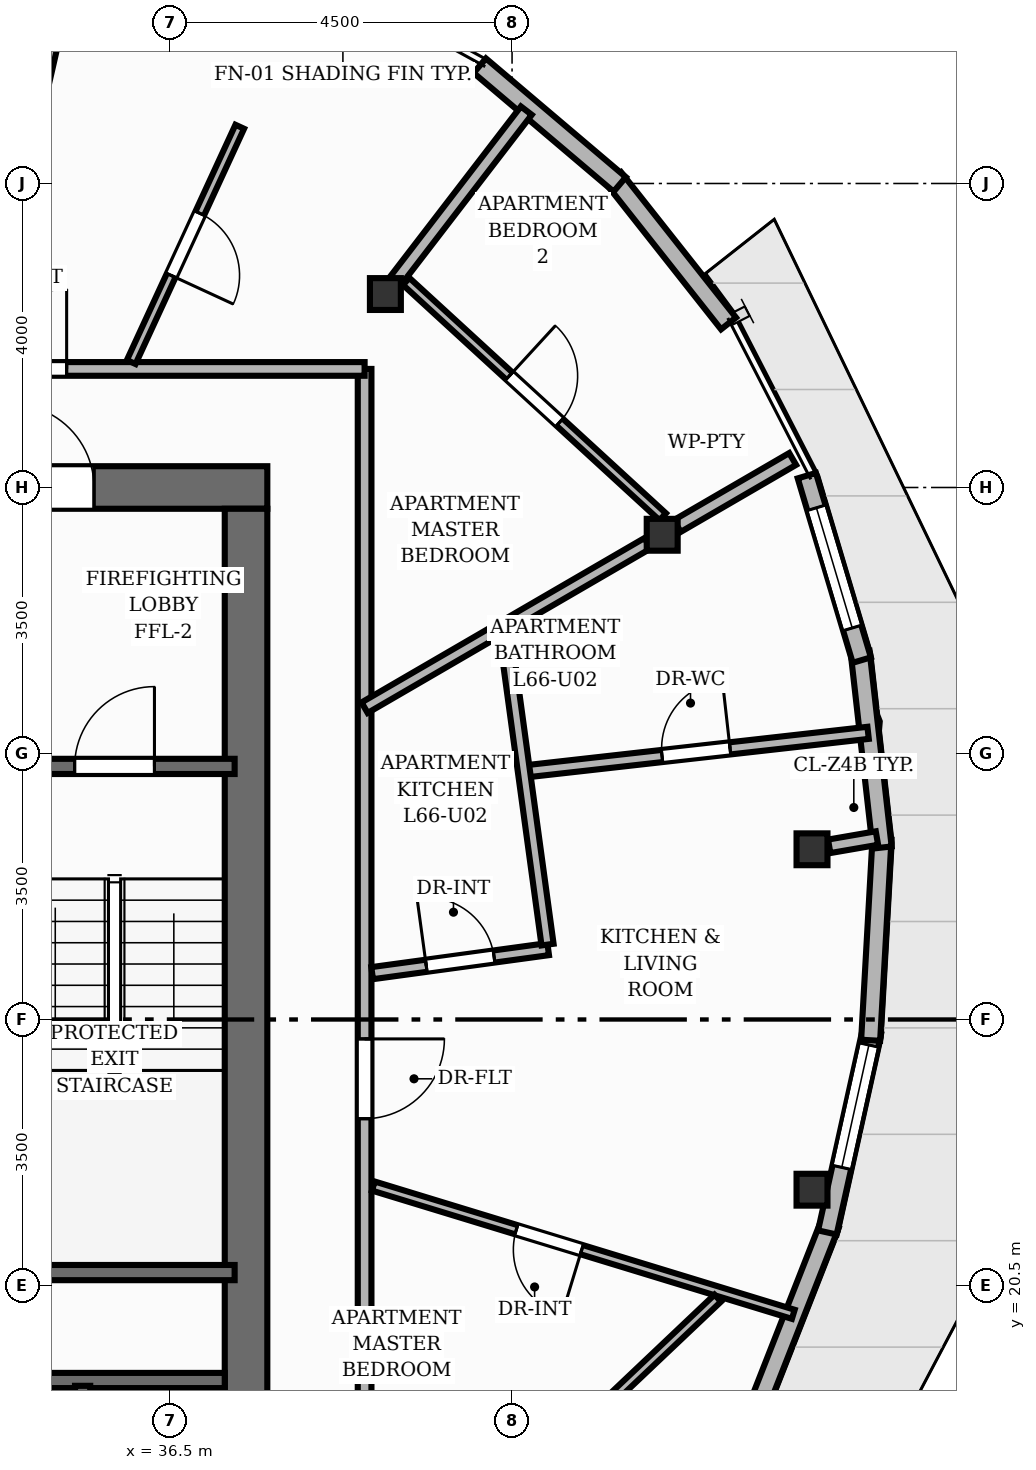
"""IFC4 building model, lengths in metres.
Left out: names, types, materials, properties, quantities, classifications, styles, units other than length and angle.
Written with IfcOpenShell. Run it as: python <this file> out.ifc"""

import sys

from ifc_helpers import new_model, si_unit, direction, frame, frame_2d, origin, origin_2d, place, context, subcontext, project, spatial, rectangle, i_section, extrude, element, fill, save


model = new_model("IFC4")
c1 = context("Model", 3, precision=1e-05, world=origin(), true_north=direction((0.0, 1.0)))
c2 = subcontext(c1, "Body", "Model", "MODEL_VIEW")
j1 = project(units=[si_unit("LENGTHUNIT", "METRE"), si_unit("PLANEANGLEUNIT", "RADIAN")], contexts=[c1])
p1 = place(None, origin())
s1 = spatial("IfcSite", under=j1, at=p1, CompositionType="ELEMENT")
p2 = place(p1, origin())
s2 = spatial("IfcBuilding", under=s1, at=p2, CompositionType="ELEMENT")
p3 = place(p2, frame((0.0, 0.0, 220.64)))
s3 = spatial("IfcBuildingStorey", under=s2, at=p3, CompositionType="ELEMENT", Elevation=220.64)
p4 = place(p3, frame((26.22, 31.0, 0.0), z_axis=(0.0, 0.0, 1.0), x_axis=(1.0, 0.0, 0.0)))
e1 = element("IfcWall", 1, at=p4, inside=s3, PredefinedType="SHEAR", context=c2, shape_type="SweptSolid", body=[
    extrude(rectangle(XDim=11.56, YDim=0.56, at=frame_2d((5.78, 0.0))), origin(), (0.0, 0.0, 1.0), 3.2),
])
p5 = place(p4, frame((8.18, 0.0, 0.0)))
e2 = element("IfcOpeningElement", 2, at=p5, cuts=e1, PredefinedType="OPENING", context=c2, shape_type="SweptSolid", body=[
    extrude(rectangle(XDim=1.1, YDim=2.15, at=frame_2d((0.55, 1.075))), frame((0.0, 0.29, 0.0), z_axis=(0.0, -1.0, 0.0), x_axis=(1.0, 0.0, 0.0)), (0.0, 0.0, 1.0), 0.58),
])
p6 = place(p4, frame((0.805, 0.0, 0.0)))
e3 = element("IfcOpeningElement", 3, at=p6, cuts=e1, PredefinedType="OPENING", context=c2, shape_type="SweptSolid", body=[
    extrude(rectangle(XDim=1.05, YDim=2.15, at=frame_2d((0.525, 1.075))), frame((0.0, 0.29, 0.0), z_axis=(0.0, -1.0, 0.0), x_axis=(1.0, 0.0, 0.0)), (0.0, 0.0, 1.0), 0.58),
])
p7 = place(p4, frame((2.555, 0.0, 0.0)))
e4 = element("IfcOpeningElement", 4, at=p7, cuts=e1, PredefinedType="OPENING", context=c2, shape_type="SweptSolid", body=[
    extrude(rectangle(XDim=1.05, YDim=2.15, at=frame_2d((0.525, 1.075))), frame((0.0, 0.29, 0.0), z_axis=(0.0, -1.0, 0.0), x_axis=(1.0, 0.0, 0.0)), (0.0, 0.0, 1.0), 0.58),
])
p8 = place(p4, frame((4.305, 0.0, 0.0)))
e5 = element("IfcOpeningElement", 5, at=p8, cuts=e1, PredefinedType="OPENING", context=c2, shape_type="SweptSolid", body=[
    extrude(rectangle(XDim=1.05, YDim=2.15, at=frame_2d((0.525, 1.075))), frame((0.0, 0.29, 0.0), z_axis=(0.0, -1.0, 0.0), x_axis=(1.0, 0.0, 0.0)), (0.0, 0.0, 1.0), 0.58),
])
p9 = place(p3, frame((37.5, 17.28, 0.0), z_axis=(0.0, 0.0, 1.0), x_axis=(0.0, 1.0, 0.0)))
e6 = element("IfcWall", 6, at=p9, inside=s3, PredefinedType="SHEAR", context=c2, shape_type="SweptSolid", body=[
    extrude(rectangle(XDim=13.44, YDim=0.56, at=frame_2d((6.72, 0.0))), origin(), (0.0, 0.0, 1.0), 3.2),
])
for number, where, z_axis, x_axis in (
    (7, (44.946, 26.24, 0.0), (0.0, 0.0, 1.0), (1.0, 0.0, 0.0)),
    (8, (42.975, 30.378, 0.0), (0.0, 0.0, 1.0), (1.0, 0.0, 0.0)),
    (9, (39.333, 33.545, 0.0), (0.0, 0.0, 1.0), (1.0, 0.0, 0.0)),
    (10, (44.946, 21.76, 0.0), (0.0, 0.0, 1.0), (1.0, 0.0, 0.0)),
):
    element("IfcColumn", number, at=place(p3, frame(where, z_axis=z_axis, x_axis=x_axis)), inside=s3, PredefinedType="COLUMN", context=c2, shape_type="SweptSolid", body=[
        extrude(i_section(OverallWidth=0.407, OverallDepth=0.419, WebThickness=0.031, FlangeThickness=0.049, at=origin_2d()), origin(), (0.0, 0.0, 1.0), 3.2),
    ])
p10 = place(p3, frame((45.18, 21.302, 0.0), z_axis=(0.0, 0.0, 1.0), x_axis=(-0.365588934877, -0.930776412838, 0.0)))
e11 = element("IfcWall", 11, at=p10, inside=s3, PredefinedType="SOLIDWALL", context=c2, shape_type="SweptSolid", body=[
    extrude(rectangle(XDim=2.739, YDim=0.25, at=frame_2d((1.369, 0.0))), origin(), (0.0, 0.0, 1.0), 2.577),
])
p11 = place(p3, frame((45.733, 23.836, 0.0), z_axis=(0.0, 0.0, 1.0), x_axis=(-0.21633718885, -0.976318708579, 0.0)))
e12 = element("IfcWall", 12, at=p11, inside=s3, PredefinedType="SOLIDWALL", context=c2, shape_type="SweptSolid", body=[
    extrude(rectangle(XDim=2.702, YDim=0.25, at=frame_2d((1.351, 0.0))), origin(), (0.0, 0.0, 1.0), 2.577),
])
p12 = place(p11, frame((0.175, 0.0, 0.85)))
e13 = element("IfcOpeningElement", 13, at=p12, cuts=e12, PredefinedType="OPENING", context=c2, shape_type="SweptSolid", body=[
    extrude(rectangle(XDim=1.65, YDim=1.55, at=frame_2d((0.825, 0.775))), frame((0.0, 0.135, 0.0), z_axis=(0.0, -1.0, 0.0), x_axis=(1.0, 0.0, 0.0)), (0.0, 0.0, 1.0), 0.27),
])
p13 = place(p3, frame((45.867, 26.374, 0.0), z_axis=(0.0, 0.0, 1.0), x_axis=(-0.056270814174, -0.998415542483, 0.0)))
e14 = element("IfcWall", 14, at=p13, inside=s3, PredefinedType="SOLIDWALL", context=c2, shape_type="SweptSolid", body=[
    extrude(rectangle(XDim=2.651, YDim=0.25, at=frame_2d((1.325, 0.0))), origin(), (0.0, 0.0, 1.0), 2.96),
])
p14 = place(p3, frame((45.579, 28.839, 0.0), z_axis=(0.0, 0.0, 1.0), x_axis=(0.112260931198, -0.993678762642, 0.0)))
e15 = element("IfcWall", 15, at=p14, inside=s3, PredefinedType="SOLIDWALL", context=c2, shape_type="SweptSolid", body=[
    extrude(rectangle(XDim=2.592, YDim=0.25, at=frame_2d((1.296, 0.0))), origin(), (0.0, 0.0, 1.0), 2.96),
])
p15 = place(p3, frame((44.878, 31.156, 0.0), z_axis=(0.0, 0.0, 1.0), x_axis=(0.285604720301, -0.958347506775, 0.0)))
e16 = element("IfcWall", 16, at=p15, inside=s3, PredefinedType="SOLIDWALL", context=c2, shape_type="SweptSolid", body=[
    extrude(rectangle(XDim=2.532, YDim=0.25, at=frame_2d((1.266, 0.0))), origin(), (0.0, 0.0, 1.0), 2.96),
])
p16 = place(p15, frame((0.441, 0.0, 0.85)))
e17 = element("IfcOpeningElement", 17, at=p16, cuts=e16, PredefinedType="OPENING", context=c2, shape_type="SweptSolid", body=[
    extrude(rectangle(XDim=1.65, YDim=1.55, at=frame_2d((0.825, 0.775))), frame((0.0, 0.135, 0.0), z_axis=(0.0, -1.0, 0.0), x_axis=(1.0, 0.0, 0.0)), (0.0, 0.0, 1.0), 0.27),
])
p17 = place(p3, frame((42.337, 35.071, 0.0), z_axis=(0.0, 0.0, 1.0), x_axis=(0.619881401672, -0.784695512833, 0.0)))
e18 = element("IfcWall", 18, at=p17, inside=s3, PredefinedType="SOLIDWALL", context=c2, shape_type="SweptSolid", body=[
    extrude(rectangle(XDim=2.437, YDim=0.25, at=frame_2d((1.218, 0.0))), origin(), (0.0, 0.0, 1.0), 2.96),
])
p18 = place(p3, frame((40.575, 36.55, 0.0), z_axis=(0.0, 0.0, 1.0), x_axis=(0.762614923672, -0.646852748462, 0.0)))
e19 = element("IfcWall", 19, at=p18, inside=s3, PredefinedType="SOLIDWALL", context=c2, shape_type="SweptSolid", body=[
    extrude(rectangle(XDim=2.415, YDim=0.25, at=frame_2d((1.208, 0.0))), origin(), (0.0, 0.0, 1.0), 2.96),
])
p19 = place(p3, frame((34.11, 20.67, 0.0), z_axis=(0.0, 0.0, 1.0), x_axis=(1.0, 0.0, 0.0)))
e20 = element("IfcWall", 20, at=p19, inside=s3, PredefinedType="SHEAR", context=c2, shape_type="SweptSolid", body=[
    extrude(rectangle(XDim=3.24, YDim=0.2, at=frame_2d((1.62, 0.0))), origin(), (0.0, 0.0, 1.0), 3.2),
])
p20 = place(p3, frame((34.11, 27.33, 0.0), z_axis=(0.0, 0.0, 1.0), x_axis=(1.0, 0.0, 0.0)))
e21 = element("IfcWall", 21, at=p20, inside=s3, PredefinedType="SHEAR", context=c2, shape_type="SweptSolid", body=[
    extrude(rectangle(XDim=3.24, YDim=0.2, at=frame_2d((1.62, 0.0))), origin(), (0.0, 0.0, 1.0), 3.2),
])
p21 = place(p20, frame((1.135, 0.0, 0.0)))
e22 = element("IfcOpeningElement", 22, at=p21, cuts=e21, PredefinedType="OPENING", context=c2, shape_type="SweptSolid", body=[
    extrude(rectangle(XDim=1.05, YDim=2.15, at=frame_2d((0.525, 1.075))), frame((0.0, 0.11, 0.0), z_axis=(0.0, -1.0, 0.0), x_axis=(1.0, 0.0, 0.0)), (0.0, 0.0, 1.0), 0.22),
])
p22 = place(p3, frame((33.5, 19.25, 0.0), z_axis=(0.0, 0.0, 1.0), x_axis=(1.0, 0.0, 0.0)))
e23 = element("IfcWall", 23, at=p22, inside=s3, PredefinedType="SHEAR", context=c2, shape_type="SweptSolid", body=[
    extrude(rectangle(XDim=3.72, YDim=0.2, at=frame_2d((1.86, 0.0))), origin(), (0.0, 0.0, 1.0), 3.2),
])
p23 = place(p3, frame((35.35, 17.32, 0.0), z_axis=(0.0, 0.0, 1.0), x_axis=(0.0, 1.0, 0.0)))
e24 = element("IfcWall", 24, at=p23, inside=s3, PredefinedType="SHEAR", context=c2, shape_type="SweptSolid", body=[
    extrude(rectangle(XDim=1.86, YDim=0.2, at=frame_2d((0.93, 0.0))), origin(), (0.0, 0.0, 1.0), 3.2),
])
p24 = place(p3, frame((45.173, 26.279, 0.0), z_axis=(0.0, 0.0, 1.0), x_axis=(0.985371537423, 0.170419873359, 0.0)))
e25 = element("IfcWall", 25, at=p24, inside=s3, PredefinedType="PARTITIONING", context=c2, shape_type="SweptSolid", body=[
    extrude(rectangle(XDim=0.637, YDim=0.18, at=frame_2d((0.319, 0.0))), origin(), (0.0, 0.0, 1.0), 2.404),
])
p25 = place(p3, frame((43.174, 30.493, 0.0), z_axis=(0.0, 0.0, 1.0), x_axis=(0.864599922959, 0.502460917106, 0.0)))
e26 = element("IfcWall", 26, at=p25, inside=s3, PredefinedType="PARTITIONING", context=c2, shape_type="SweptSolid", body=[
    extrude(rectangle(XDim=1.756, YDim=0.18, at=frame_2d((0.878, 0.0))), origin(), (0.0, 0.0, 1.0), 2.404),
])
p26 = place(p3, frame((39.473, 33.727, 0.0), z_axis=(0.0, 0.0, 1.0), x_axis=(0.609232660573, 0.792991529142, 0.0)))
e27 = element("IfcWall", 27, at=p26, inside=s3, PredefinedType="PARTITIONING", context=c2, shape_type="SweptSolid", body=[
    extrude(rectangle(XDim=2.814, YDim=0.18, at=frame_2d((1.407, 0.0))), origin(), (0.0, 0.0, 1.0), 2.404),
])
p27 = place(p3, frame((34.626, 35.483, 0.0), z_axis=(0.0, 0.0, 1.0), x_axis=(0.22291168124, 0.974838644272, 0.0)))
e28 = element("IfcWall", 28, at=p27, inside=s3, PredefinedType="PARTITIONING", context=c2, shape_type="SweptSolid", body=[
    extrude(rectangle(XDim=2.976, YDim=0.18, at=frame_2d((1.488, 0.0))), origin(), (0.0, 0.0, 1.0), 2.404),
])
p28 = place(p3, frame((39.06, 32.56, 0.0), z_axis=(0.0, 0.0, 1.0), x_axis=(0.0, -1.0, 0.0)))
e29 = element("IfcWall", 29, at=p28, inside=s3, PredefinedType="PARTITIONING", context=c2, shape_type="SweptSolid", body=[
    extrude(rectangle(XDim=17.12, YDim=0.18, at=frame_2d((8.56, 0.0))), origin(), (0.0, 0.0, 1.0), 2.955),
])
p29 = place(p28, frame((8.815, 0.0, 0.0)))
e30 = element("IfcOpeningElement", 30, at=p29, cuts=e29, PredefinedType="OPENING", context=c2, shape_type="SweptSolid", body=[
    extrude(rectangle(XDim=1.05, YDim=2.15, at=frame_2d((0.525, 1.075))), frame((0.0, 0.1, 0.0), z_axis=(0.0, -1.0, 0.0), x_axis=(1.0, 0.0, 0.0)), (0.0, 0.0, 1.0), 0.2),
])
p30 = place(p3, frame((33.26, 32.56, 0.0), z_axis=(0.0, 0.0, 1.0), x_axis=(1.0, 0.0, 0.0)))
e31 = element("IfcWall", 31, at=p30, inside=s3, PredefinedType="PARTITIONING", context=c2, shape_type="SweptSolid", body=[
    extrude(rectangle(XDim=5.8, YDim=0.18, at=frame_2d((2.9, 0.0))), origin(), (0.0, 0.0, 1.0), 2.955),
])
p31 = place(p30, frame((0.83, 0.0, 0.0)))
e32 = element("IfcOpeningElement", 32, at=p31, cuts=e31, PredefinedType="OPENING", context=c2, shape_type="SweptSolid", body=[
    extrude(rectangle(XDim=1.05, YDim=2.15, at=frame_2d((0.525, 1.075))), frame((0.0, 0.1, 0.0), z_axis=(0.0, -1.0, 0.0), x_axis=(1.0, 0.0, 0.0)), (0.0, 0.0, 1.0), 0.2),
])
p32 = place(p3, frame((41.156, 27.262, 0.0), z_axis=(0.0, 0.0, 1.0), x_axis=(0.993735184374, 0.111760383578, 0.0)))
e33 = element("IfcWall", 33, at=p32, inside=s3, PredefinedType="PLUMBINGWALL", context=c2, shape_type="SweptSolid", body=[
    extrude(rectangle(XDim=4.557, YDim=0.16, at=frame_2d((2.278, 0.0))), origin(), (0.0, 0.0, 1.0), 2.692),
])
p33 = place(p32, frame((1.829, 0.0, 0.0)))
e34 = element("IfcOpeningElement", 34, at=p33, cuts=e33, PredefinedType="OPENING", context=c2, shape_type="SweptSolid", body=[
    extrude(rectangle(XDim=0.9, YDim=2.1, at=frame_2d((0.45, 1.05))), frame((0.0, 0.09, 0.0), z_axis=(0.0, -1.0, 0.0), x_axis=(1.0, 0.0, 0.0)), (0.0, 0.0, 1.0), 0.18),
])
p34 = place(p3, frame((44.7, 20.121, 0.0), z_axis=(0.0, 0.0, 1.0), x_axis=(-0.956379122361, 0.29212835246, 0.0)))
e35 = element("IfcWall", 35, at=p34, inside=s3, PredefinedType="PARTITIONING", context=c2, shape_type="SweptSolid", body=[
    extrude(rectangle(XDim=5.777, YDim=0.125, at=frame_2d((2.889, 0.0))), origin(), (0.0, 0.0, 1.0), 2.692),
])
p35 = place(p34, frame((2.91, 0.0, 0.0)))
e36 = element("IfcOpeningElement", 36, at=p35, cuts=e35, PredefinedType="OPENING", context=c2, shape_type="SweptSolid", body=[
    extrude(rectangle(XDim=0.9, YDim=2.1, at=frame_2d((0.45, 1.05))), frame((0.0, 0.073, 0.0), z_axis=(0.0, -1.0, 0.0), x_axis=(1.0, 0.0, 0.0)), (0.0, 0.0, 1.0), 0.145),
])
p36 = place(p3, frame((39.159, 24.61, 0.0), z_axis=(0.0, 0.0, 1.0), x_axis=(0.990823810893, 0.135159815654, 0.0)))
e37 = element("IfcWall", 37, at=p36, inside=s3, PredefinedType="PLUMBINGWALL", context=c2, shape_type="SweptSolid", body=[
    extrude(rectangle(XDim=2.337, YDim=0.16, at=frame_2d((1.169, 0.0))), origin(), (0.0, 0.0, 1.0), 2.692),
])
p37 = place(p36, frame((0.719, 0.0, 0.0)))
e38 = element("IfcOpeningElement", 38, at=p37, cuts=e37, PredefinedType="OPENING", context=c2, shape_type="SweptSolid", body=[
    extrude(rectangle(XDim=0.9, YDim=2.1, at=frame_2d((0.45, 1.05))), frame((0.0, 0.09, 0.0), z_axis=(0.0, -1.0, 0.0), x_axis=(1.0, 0.0, 0.0)), (0.0, 0.0, 1.0), 0.18),
])
p38 = place(p3, frame((41.467, 24.985, 0.0), z_axis=(0.0, 0.0, 1.0), x_axis=(-0.135218975067, 0.990815739066, 0.0)))
e39 = element("IfcWall", 39, at=p38, inside=s3, PredefinedType="PLUMBINGWALL", context=c2, shape_type="SweptSolid", body=[
    extrude(rectangle(XDim=4.223, YDim=0.16, at=frame_2d((2.112, 0.0))), origin(), (0.0, 0.0, 1.0), 2.955),
])
p39 = place(p3, frame((39.06, 28.103, 0.0), z_axis=(0.0, 0.0, 1.0), x_axis=(0.864618907014, 0.502428249239, 0.0)))
e40 = element("IfcWall", 40, at=p39, inside=s3, PredefinedType="PLUMBINGWALL", context=c2, shape_type="SweptSolid", body=[
    extrude(rectangle(XDim=4.305, YDim=0.16, at=frame_2d((2.153, 0.0))), origin(), (0.0, 0.0, 1.0), 2.404),
])
p40 = place(p3, frame((43.707, 20.333, 0.0), z_axis=(0.0, 0.0, 1.0), x_axis=(-0.725799476315, -0.687906330965, 0.0)))
e41 = element("IfcWall", 41, at=p40, inside=s3, PredefinedType="PARTITIONING", context=c2, shape_type="SweptSolid", body=[
    extrude(rectangle(XDim=6.282, YDim=0.125, at=frame_2d((3.141, 0.0))), origin(), (0.0, 0.0, 1.0), 2.955),
])
p41 = place(p40, frame((2.691, 0.0, 0.0)))
e42 = element("IfcOpeningElement", 42, at=p41, cuts=e41, PredefinedType="OPENING", context=c2, shape_type="SweptSolid", body=[
    extrude(rectangle(XDim=0.9, YDim=2.1, at=frame_2d((0.45, 1.05))), frame((0.0, 0.073, 0.0), z_axis=(0.0, -1.0, 0.0), x_axis=(1.0, 0.0, 0.0)), (0.0, 0.0, 1.0), 0.145),
])
p42 = place(p3, frame((37.417, 35.747, 0.0), z_axis=(0.0, 0.0, 1.0), x_axis=(-0.41880384085, -0.908076727424, 0.0)))
e43 = element("IfcWall", 43, at=p42, inside=s3, PredefinedType="PARTITIONING", context=c2, shape_type="SweptSolid", body=[
    extrude(rectangle(XDim=3.409, YDim=0.125, at=frame_2d((1.705, 0.0))), origin(), (0.0, 0.0, 1.0), 2.955),
])
p43 = place(p42, frame((1.255, 0.0, 0.0)))
e44 = element("IfcOpeningElement", 44, at=p43, cuts=e43, PredefinedType="OPENING", context=c2, shape_type="SweptSolid", body=[
    extrude(rectangle(XDim=0.9, YDim=2.1, at=frame_2d((0.45, 1.05))), frame((0.0, 0.073, 0.0), z_axis=(0.0, -1.0, 0.0), x_axis=(1.0, 0.0, 0.0)), (0.0, 0.0, 1.0), 0.145),
])
p44 = place(p3, frame((39.607, 33.712, 0.0), z_axis=(0.0, 0.0, 1.0), x_axis=(0.736828890574, -0.676079274949, 0.0)))
e45 = element("IfcWall", 45, at=p44, inside=s3, PredefinedType="PARTITIONING", context=c2, shape_type="SweptSolid", body=[
    extrude(rectangle(XDim=4.582, YDim=0.125, at=frame_2d((2.291, 0.0))), origin(), (0.0, 0.0, 1.0), 2.488),
])
p45 = place(p44, frame((1.841, 0.0, 0.0)))
e46 = element("IfcOpeningElement", 46, at=p45, cuts=e45, PredefinedType="OPENING", context=c2, shape_type="SweptSolid", body=[
    extrude(rectangle(XDim=0.9, YDim=2.1, at=frame_2d((0.45, 1.05))), frame((0.0, 0.073, 0.0), z_axis=(0.0, -1.0, 0.0), x_axis=(1.0, 0.0, 0.0)), (0.0, 0.0, 1.0), 0.145),
])
p46 = place(p12, origin())
e47 = element("IfcWindow", 47, at=p46, inside=s3, PartitioningType="SINGLE_PANEL", PredefinedType="WINDOW", context=c2, shape_type="SweptSolid", body=[
    extrude(rectangle(XDim=1.65, YDim=1.55, at=frame_2d((0.825, 0.775))), frame((0.0, 0.03, 0.0), z_axis=(0.0, -1.0, 0.0), x_axis=(1.0, 0.0, 0.0)), (0.0, 0.0, 1.0), 0.06),
])
fill(e13, e47)
p47 = place(p16, origin())
e48 = element("IfcWindow", 48, at=p47, inside=s3, PartitioningType="SINGLE_PANEL", PredefinedType="WINDOW", context=c2, shape_type="SweptSolid", body=[
    extrude(rectangle(XDim=1.65, YDim=1.55, at=frame_2d((0.825, 0.775))), frame((0.0, 0.03, 0.0), z_axis=(0.0, -1.0, 0.0), x_axis=(1.0, 0.0, 0.0)), (0.0, 0.0, 1.0), 0.06),
])
fill(e17, e48)
p48 = place(p21, origin())
e49 = element("IfcDoor", 49, at=p48, inside=s3, OperationType="SINGLE_SWING_RIGHT", PredefinedType="DOOR", context=c2, shape_type="SweptSolid", body=[
    extrude(rectangle(XDim=1.05, YDim=2.15, at=frame_2d((0.525, 1.075))), frame((0.0, 0.025, 0.0), z_axis=(0.0, -1.0, 0.0), x_axis=(1.0, 0.0, 0.0)), (0.0, 0.0, 1.0), 0.05),
])
fill(e22, e49)
p49 = place(p5, origin())
e50 = element("IfcDoor", 50, at=p49, inside=s3, OperationType="SINGLE_SWING_LEFT", PredefinedType="DOOR", context=c2, shape_type="SweptSolid", body=[
    extrude(rectangle(XDim=1.1, YDim=2.15, at=frame_2d((0.55, 1.075))), frame((0.0, 0.025, 0.0), z_axis=(0.0, -1.0, 0.0), x_axis=(1.0, 0.0, 0.0)), (0.0, 0.0, 1.0), 0.05),
])
fill(e2, e50)
p50 = place(p29, origin())
e51 = element("IfcDoor", 51, at=p50, inside=s3, OperationType="SINGLE_SWING_LEFT", PredefinedType="DOOR", context=c2, shape_type="SweptSolid", body=[
    extrude(rectangle(XDim=1.05, YDim=2.15, at=frame_2d((0.525, 1.075))), frame((0.0, 0.025, 0.0), z_axis=(0.0, -1.0, 0.0), x_axis=(1.0, 0.0, 0.0)), (0.0, 0.0, 1.0), 0.05),
])
fill(e30, e51)
p51 = place(p33, origin())
e52 = element("IfcDoor", 52, at=p51, inside=s3, OperationType="SINGLE_SWING_RIGHT", PredefinedType="DOOR", context=c2, shape_type="SweptSolid", body=[
    extrude(rectangle(XDim=0.9, YDim=2.1, at=frame_2d((0.45, 1.05))), frame((0.0, 0.025, 0.0), z_axis=(0.0, -1.0, 0.0), x_axis=(1.0, 0.0, 0.0)), (0.0, 0.0, 1.0), 0.05),
])
fill(e34, e52)
p52 = place(p35, origin())
e53 = element("IfcDoor", 53, at=p52, inside=s3, OperationType="SINGLE_SWING_LEFT", PredefinedType="DOOR", context=c2, shape_type="SweptSolid", body=[
    extrude(rectangle(XDim=0.9, YDim=2.1, at=frame_2d((0.45, 1.05))), frame((0.0, 0.025, 0.0), z_axis=(0.0, -1.0, 0.0), x_axis=(1.0, 0.0, 0.0)), (0.0, 0.0, 1.0), 0.05),
])
fill(e36, e53)
p53 = place(p37, origin())
e54 = element("IfcDoor", 54, at=p53, inside=s3, OperationType="SINGLE_SWING_LEFT", PredefinedType="DOOR", context=c2, shape_type="SweptSolid", body=[
    extrude(rectangle(XDim=0.9, YDim=2.1, at=frame_2d((0.45, 1.05))), frame((0.0, 0.025, 0.0), z_axis=(0.0, -1.0, 0.0), x_axis=(1.0, 0.0, 0.0)), (0.0, 0.0, 1.0), 0.05),
])
fill(e38, e54)
p54 = place(p31, origin())
e55 = element("IfcDoor", 55, at=p54, inside=s3, OperationType="SINGLE_SWING_RIGHT", PredefinedType="DOOR", context=c2, shape_type="SweptSolid", body=[
    extrude(rectangle(XDim=1.05, YDim=2.15, at=frame_2d((0.525, 1.075))), frame((0.0, 0.025, 0.0), z_axis=(0.0, -1.0, 0.0), x_axis=(1.0, 0.0, 0.0)), (0.0, 0.0, 1.0), 0.05),
])
fill(e32, e55)
p55 = place(p43, origin())
e56 = element("IfcDoor", 56, at=p55, inside=s3, OperationType="SINGLE_SWING_RIGHT", PredefinedType="DOOR", context=c2, shape_type="SweptSolid", body=[
    extrude(rectangle(XDim=0.9, YDim=2.1, at=frame_2d((0.45, 1.05))), frame((0.0, 0.025, 0.0), z_axis=(0.0, -1.0, 0.0), x_axis=(1.0, 0.0, 0.0)), (0.0, 0.0, 1.0), 0.05),
])
fill(e44, e56)
p56 = place(p45, origin())
e57 = element("IfcDoor", 57, at=p56, inside=s3, OperationType="SINGLE_SWING_LEFT", PredefinedType="DOOR", context=c2, shape_type="SweptSolid", body=[
    extrude(rectangle(XDim=0.9, YDim=2.1, at=frame_2d((0.45, 1.05))), frame((0.0, 0.025, 0.0), z_axis=(0.0, -1.0, 0.0), x_axis=(1.0, 0.0, 0.0)), (0.0, 0.0, 1.0), 0.05),
])
fill(e46, e57)
save(model, sys.argv[1])
